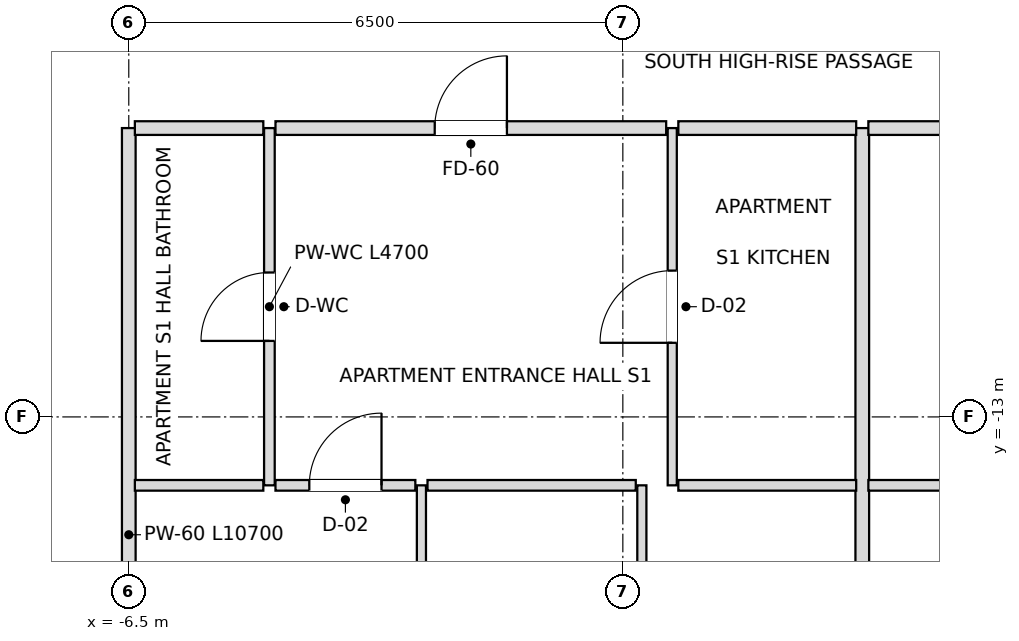
"""IFC4 building model, lengths in metres.
Left out: names, types, materials, properties, quantities, classifications, styles, units other than length and angle.
Written with IfcOpenShell. Run it as: python <this file> out.ifc"""

import sys

from ifc_helpers import new_model, si_unit, direction, frame, frame_2d, origin, place, context, subcontext, project, spatial, rectangle, extrude, element, fill, save


model = new_model("IFC4")
c1 = context("Model", 3, precision=1e-05, world=origin(), true_north=direction((0.0, 1.0)))
c2 = subcontext(c1, "Body", "Model", "MODEL_VIEW")
j1 = project(units=[si_unit("LENGTHUNIT", "METRE"), si_unit("PLANEANGLEUNIT", "RADIAN")], contexts=[c1])
p1 = place(None, origin())
s1 = spatial("IfcSite", under=j1, at=p1, CompositionType="ELEMENT")
p2 = place(p1, origin())
s2 = spatial("IfcBuilding", under=s1, at=p2, CompositionType="ELEMENT")
p3 = place(p2, frame((0.0, 0.0, 240.3)))
s3 = spatial("IfcBuildingStorey", under=s2, at=p3, CompositionType="ELEMENT", Elevation=240.3)
p4 = place(p3, frame((-6.5, -19.9, 0.0), z_axis=(0.0, 0.0, 1.0), x_axis=(0.0, 1.0, 0.0)))
e1 = element("IfcWall", 1, at=p4, inside=s3, PredefinedType="PARTITIONING", context=c2, shape_type="SweptSolid", body=[
    extrude(rectangle(XDim=10.7, YDim=0.18, at=frame_2d((5.35, 0.0))), origin(), (0.0, 0.0, 1.0), 2.826),
])
p5 = place(p3, frame((-4.65, -13.9, 0.0), z_axis=(0.0, 0.0, 1.0), x_axis=(0.0, 1.0, 0.0)))
e2 = element("IfcWall", 2, at=p5, inside=s3, PredefinedType="PARTITIONING", context=c2, shape_type="SweptSolid", body=[
    extrude(rectangle(XDim=4.7, YDim=0.14, at=frame_2d((2.35, 0.0))), origin(), (0.0, 0.0, 1.0), 3.38),
])
p6 = place(p5, frame((1.9, 0.0, 0.0)))
e3 = element("IfcOpeningElement", 3, at=p6, cuts=e2, PredefinedType="OPENING", context=c2, shape_type="SweptSolid", body=[
    extrude(rectangle(XDim=0.9, YDim=2.1, at=frame_2d((0.45, 1.05))), frame((0.0, 0.08, 0.0), z_axis=(0.0, -1.0, 0.0), x_axis=(1.0, 0.0, 0.0)), (0.0, 0.0, 1.0), 0.16),
])
p7 = place(p3, frame((-2.65, -19.9, 0.0), z_axis=(0.0, 0.0, 1.0), x_axis=(0.0, 1.0, 0.0)))
e4 = element("IfcWall", 4, at=p7, inside=s3, PredefinedType="PARTITIONING", context=c2, shape_type="SweptSolid", body=[
    extrude(rectangle(XDim=6.0, YDim=0.12, at=frame_2d((3.0, 0.0))), origin(), (0.0, 0.0, 1.0), 3.018),
])
p8 = place(p7, frame((2.55, 0.0, 0.0)))
e5 = element("IfcOpeningElement", 5, at=p8, cuts=e4, PredefinedType="OPENING", context=c2, shape_type="SweptSolid", body=[
    extrude(rectangle(XDim=0.9, YDim=2.1, at=frame_2d((0.45, 1.05))), frame((0.0, 0.07, 0.0), z_axis=(0.0, -1.0, 0.0), x_axis=(1.0, 0.0, 0.0)), (0.0, 0.0, 1.0), 0.14),
])
p9 = place(p3, frame((0.25, -19.9, 0.0), z_axis=(0.0, 0.0, 1.0), x_axis=(0.0, 1.0, 0.0)))
e6 = element("IfcWall", 6, at=p9, inside=s3, PredefinedType="PARTITIONING", context=c2, shape_type="SweptSolid", body=[
    extrude(rectangle(XDim=6.0, YDim=0.12, at=frame_2d((3.0, 0.0))), origin(), (0.0, 0.0, 1.0), 3.018),
])
p10 = place(p9, frame((2.55, 0.0, 0.0)))
e7 = element("IfcOpeningElement", 7, at=p10, cuts=e6, PredefinedType="OPENING", context=c2, shape_type="SweptSolid", body=[
    extrude(rectangle(XDim=0.9, YDim=2.1, at=frame_2d((0.45, 1.05))), frame((0.0, 0.07, 0.0), z_axis=(0.0, -1.0, 0.0), x_axis=(1.0, 0.0, 0.0)), (0.0, 0.0, 1.0), 0.14),
])
p11 = place(p3, frame((0.65, -13.9, 0.0), z_axis=(0.0, 0.0, 1.0), x_axis=(0.0, 1.0, 0.0)))
e8 = element("IfcWall", 8, at=p11, inside=s3, PredefinedType="PARTITIONING", context=c2, shape_type="SweptSolid", body=[
    extrude(rectangle(XDim=4.7, YDim=0.12, at=frame_2d((2.35, 0.0))), origin(), (0.0, 0.0, 1.0), 3.38),
])
p12 = place(p11, frame((1.875, 0.0, 0.0)))
e9 = element("IfcOpeningElement", 9, at=p12, cuts=e8, PredefinedType="OPENING", context=c2, shape_type="SweptSolid", body=[
    extrude(rectangle(XDim=0.95, YDim=2.1, at=frame_2d((0.475, 1.05))), frame((0.0, 0.07, 0.0), z_axis=(0.0, -1.0, 0.0), x_axis=(1.0, 0.0, 0.0)), (0.0, 0.0, 1.0), 0.14),
])
p13 = place(p3, frame((3.15, -19.9, 0.0), z_axis=(0.0, 0.0, 1.0), x_axis=(0.0, 1.0, 0.0)))
e10 = element("IfcWall", 10, at=p13, inside=s3, PredefinedType="PARTITIONING", context=c2, shape_type="SweptSolid", body=[
    extrude(rectangle(XDim=10.7, YDim=0.18, at=frame_2d((5.35, 0.0))), origin(), (0.0, 0.0, 1.0), 3.018),
])
p14 = place(p3, frame((-6.42, -13.9, 0.0), z_axis=(0.0, 0.0, 1.0), x_axis=(1.0, 0.0, 0.0)))
e11 = element("IfcWall", 11, at=p14, inside=s3, PredefinedType="PARTITIONING", context=c2, shape_type="SweptSolid", body=[
    extrude(rectangle(XDim=1.69, YDim=0.14, at=frame_2d((0.845, 0.0))), origin(), (0.0, 0.0, 1.0), 3.38),
])
p15 = place(p3, frame((-4.57, -13.9, 0.0), z_axis=(0.0, 0.0, 1.0), x_axis=(1.0, 0.0, 0.0)))
e12 = element("IfcWall", 12, at=p15, inside=s3, PredefinedType="PARTITIONING", context=c2, shape_type="SweptSolid", body=[
    extrude(rectangle(XDim=1.84, YDim=0.14, at=frame_2d((0.92, 0.0))), origin(), (0.0, 0.0, 1.0), 3.38),
])
p16 = place(p15, frame((0.445, 0.0, 0.0)))
e13 = element("IfcOpeningElement", 13, at=p16, cuts=e12, PredefinedType="OPENING", context=c2, shape_type="SweptSolid", body=[
    extrude(rectangle(XDim=0.95, YDim=2.1, at=frame_2d((0.475, 1.05))), frame((0.0, 0.08, 0.0), z_axis=(0.0, -1.0, 0.0), x_axis=(1.0, 0.0, 0.0)), (0.0, 0.0, 1.0), 0.16),
])
p17 = place(p3, frame((-2.57, -13.9, 0.0), z_axis=(0.0, 0.0, 1.0), x_axis=(1.0, 0.0, 0.0)))
e14 = element("IfcWall", 14, at=p17, inside=s3, PredefinedType="PARTITIONING", context=c2, shape_type="SweptSolid", body=[
    extrude(rectangle(XDim=2.74, YDim=0.14, at=frame_2d((1.37, 0.0))), origin(), (0.0, 0.0, 1.0), 3.38),
])
p18 = place(p3, frame((0.73, -13.9, 0.0), z_axis=(0.0, 0.0, 1.0), x_axis=(1.0, 0.0, 0.0)))
e15 = element("IfcWall", 15, at=p18, inside=s3, PredefinedType="PARTITIONING", context=c2, shape_type="SweptSolid", body=[
    extrude(rectangle(XDim=2.34, YDim=0.14, at=frame_2d((1.17, 0.0))), origin(), (0.0, 0.0, 1.0), 3.38),
])
p19 = place(p3, frame((3.23, -13.9, 0.0), z_axis=(0.0, 0.0, 1.0), x_axis=(1.0, 0.0, 0.0)))
e16 = element("IfcWall", 16, at=p19, inside=s3, PredefinedType="PARTITIONING", context=c2, shape_type="SweptSolid", body=[
    extrude(rectangle(XDim=4.14, YDim=0.14, at=frame_2d((2.07, 0.0))), origin(), (0.0, 0.0, 1.0), 2.826),
])
p20 = place(p19, frame((1.605, 0.0, 0.0)))
e17 = element("IfcOpeningElement", 17, at=p20, cuts=e16, PredefinedType="OPENING", context=c2, shape_type="SweptSolid", body=[
    extrude(rectangle(XDim=0.95, YDim=2.1, at=frame_2d((0.475, 1.05))), frame((0.0, 0.08, 0.0), z_axis=(0.0, -1.0, 0.0), x_axis=(1.0, 0.0, 0.0)), (0.0, 0.0, 1.0), 0.16),
])
p21 = place(p3, frame((-6.42, -9.2, 0.0), z_axis=(0.0, 0.0, 1.0), x_axis=(1.0, 0.0, 0.0)))
e18 = element("IfcWall", 18, at=p21, inside=s3, PredefinedType="PARTITIONING", context=c2, shape_type="SweptSolid", body=[
    extrude(rectangle(XDim=1.69, YDim=0.18, at=frame_2d((0.845, 0.0))), origin(), (0.0, 0.0, 1.0), 3.38),
])
p22 = place(p3, frame((-4.57, -9.2, 0.0), z_axis=(0.0, 0.0, 1.0), x_axis=(1.0, 0.0, 0.0)))
e19 = element("IfcWall", 19, at=p22, inside=s3, PredefinedType="PARTITIONING", context=c2, shape_type="SweptSolid", body=[
    extrude(rectangle(XDim=5.14, YDim=0.18, at=frame_2d((2.57, 0.0))), origin(), (0.0, 0.0, 1.0), 3.38),
])
p23 = place(p22, frame((2.095, 0.0, 0.0)))
e20 = element("IfcOpeningElement", 20, at=p23, cuts=e19, PredefinedType="OPENING", context=c2, shape_type="SweptSolid", body=[
    extrude(rectangle(XDim=0.95, YDim=2.15, at=frame_2d((0.475, 1.075))), frame((0.0, 0.1, 0.0), z_axis=(0.0, -1.0, 0.0), x_axis=(1.0, 0.0, 0.0)), (0.0, 0.0, 1.0), 0.2),
])
p24 = place(p3, frame((0.73, -9.2, 0.0), z_axis=(0.0, 0.0, 1.0), x_axis=(1.0, 0.0, 0.0)))
e21 = element("IfcWall", 21, at=p24, inside=s3, PredefinedType="PARTITIONING", context=c2, shape_type="SweptSolid", body=[
    extrude(rectangle(XDim=2.34, YDim=0.18, at=frame_2d((1.17, 0.0))), origin(), (0.0, 0.0, 1.0), 3.38),
])
p25 = place(p3, frame((3.23, -9.2, 0.0), z_axis=(0.0, 0.0, 1.0), x_axis=(1.0, 0.0, 0.0)))
e22 = element("IfcWall", 22, at=p25, inside=s3, PredefinedType="PARTITIONING", context=c2, shape_type="SweptSolid", body=[
    extrude(rectangle(XDim=4.14, YDim=0.18, at=frame_2d((2.07, 0.0))), origin(), (0.0, 0.0, 1.0), 2.826),
])
p26 = place(p25, frame((1.605, 0.0, 0.0)))
e23 = element("IfcOpeningElement", 23, at=p26, cuts=e22, PredefinedType="OPENING", context=c2, shape_type="SweptSolid", body=[
    extrude(rectangle(XDim=0.95, YDim=2.15, at=frame_2d((0.475, 1.075))), frame((0.0, 0.1, 0.0), z_axis=(0.0, -1.0, 0.0), x_axis=(1.0, 0.0, 0.0)), (0.0, 0.0, 1.0), 0.2),
])
p27 = place(p6, origin())
e24 = element("IfcDoor", 24, at=p27, inside=s3, OperationType="SINGLE_SWING_LEFT", PredefinedType="DOOR", context=c2, shape_type="SweptSolid", body=[
    extrude(rectangle(XDim=0.9, YDim=2.1, at=frame_2d((0.45, 1.05))), frame((0.0, 0.025, 0.0), z_axis=(0.0, -1.0, 0.0), x_axis=(1.0, 0.0, 0.0)), (0.0, 0.0, 1.0), 0.05),
])
fill(e3, e24)
p28 = place(p23, origin())
e25 = element("IfcDoor", 25, at=p28, inside=s3, OperationType="SINGLE_SWING_RIGHT", PredefinedType="DOOR", context=c2, shape_type="SweptSolid", body=[
    extrude(rectangle(XDim=0.95, YDim=2.15, at=frame_2d((0.475, 1.075))), frame((0.0, 0.025, 0.0), z_axis=(0.0, -1.0, 0.0), x_axis=(1.0, 0.0, 0.0)), (0.0, 0.0, 1.0), 0.05),
])
fill(e20, e25)
p29 = place(p12, origin())
e26 = element("IfcDoor", 26, at=p29, inside=s3, OperationType="SINGLE_SWING_LEFT", PredefinedType="DOOR", context=c2, shape_type="SweptSolid", body=[
    extrude(rectangle(XDim=0.95, YDim=2.1, at=frame_2d((0.475, 1.05))), frame((0.0, 0.025, 0.0), z_axis=(0.0, -1.0, 0.0), x_axis=(1.0, 0.0, 0.0)), (0.0, 0.0, 1.0), 0.05),
])
fill(e9, e26)
p30 = place(p16, origin())
e27 = element("IfcDoor", 27, at=p30, inside=s3, OperationType="SINGLE_SWING_RIGHT", PredefinedType="DOOR", context=c2, shape_type="SweptSolid", body=[
    extrude(rectangle(XDim=0.95, YDim=2.1, at=frame_2d((0.475, 1.05))), frame((0.0, 0.025, 0.0), z_axis=(0.0, -1.0, 0.0), x_axis=(1.0, 0.0, 0.0)), (0.0, 0.0, 1.0), 0.05),
])
fill(e13, e27)
save(model, sys.argv[1])
